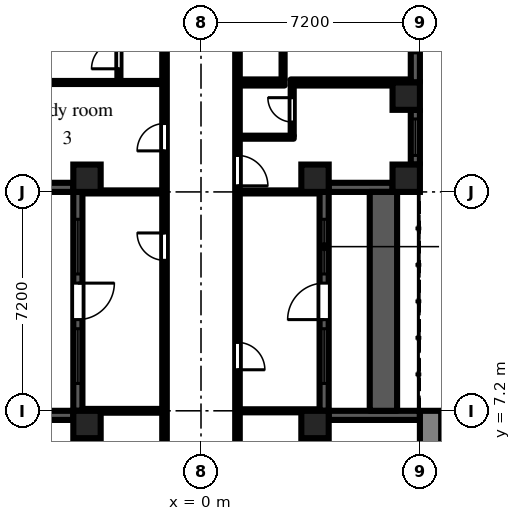
"""IFC4 building model, lengths in metres.
Left out: names, types, materials, properties, quantities, classifications, styles, units other than length and angle.
Written with IfcOpenShell. Run it as: python <this file> out.ifc"""

import sys

from ifc_helpers import new_model, si_unit, direction, frame, frame_2d, origin, origin_2d, place, context, subcontext, project, spatial, rectangle, extrude, element, fill, save


model = new_model("IFC4")
c1 = context("Model", 3, precision=1e-05, world=origin(), true_north=direction((0.0, 1.0)))
c2 = subcontext(c1, "Body", "Model", "MODEL_VIEW")
j1 = project(units=[si_unit("LENGTHUNIT", "METRE"), si_unit("PLANEANGLEUNIT", "RADIAN")], contexts=[c1])
p1 = place(None, origin())
s1 = spatial("IfcSite", under=j1, at=p1, CompositionType="ELEMENT")
p2 = place(p1, origin())
s2 = spatial("IfcBuilding", under=s1, at=p2, CompositionType="ELEMENT")
p3 = place(p2, frame((0.0, 0.0, 29.7)))
s3 = spatial("IfcBuildingStorey", under=s2, at=p3, CompositionType="ELEMENT", Elevation=29.7)
for number, where, z_axis, x_axis in (
    (1, (-3.75, 6.75, 0.0), (0.0, 0.0, 1.0), (1.0, 0.0, 0.0)),
    (2, (-3.75, 14.85, 0.0), (0.0, 0.0, 1.0), (1.0, 0.0, 0.0)),
    (3, (3.75, 6.75, 0.0), (0.0, 0.0, 1.0), (1.0, 0.0, 0.0)),
    (4, (3.75, 14.85, 0.0), (0.0, 0.0, 1.0), (1.0, 0.0, 0.0)),
    (5, (6.75, 14.85, 0.0), (0.0, 0.0, 1.0), (1.0, 0.0, 0.0)),
    (6, (6.75, 17.55, 0.0), (0.0, 0.0, 1.0), (1.0, 0.0, 0.0)),
):
    element("IfcColumn", number, at=place(p3, frame(where, z_axis=z_axis, x_axis=x_axis)), inside=s3, PredefinedType="COLUMN", context=c2, shape_type="SweptSolid", body=[
        extrude(rectangle(XDim=0.9, YDim=0.9, at=origin_2d()), origin(), (0.0, 0.0, 1.0), 3.0),
    ])
p4 = place(p3, frame((7.2, 7.05, 0.0), z_axis=(0.0, 0.0, 1.0), x_axis=(-1.0, 0.0, 0.0)))
e7 = element("IfcWall", 7, at=p4, inside=s3, PredefinedType="SOLIDWALL", context=c2, shape_type="SweptSolid", body=[
    extrude(rectangle(XDim=3.0, YDim=0.3, at=frame_2d((1.5, 0.0))), origin(), (0.0, 0.0, 1.0), 2.1),
])
p5 = place(p3, frame((4.05, 7.2, 0.0), z_axis=(0.0, 0.0, 1.0), x_axis=(0.0, 1.0, 0.0)))
e8 = element("IfcWall", 8, at=p5, inside=s3, PredefinedType="SOLIDWALL", context=c2, shape_type="SweptSolid", body=[
    extrude(rectangle(XDim=7.2, YDim=0.3, at=frame_2d((3.6, 0.0))), origin(), (0.0, 0.0, 1.0), 2.1),
])
p6 = place(p5, frame((3.0, 0.0, 0.0)))
e9 = element("IfcOpeningElement", 9, at=p6, cuts=e8, PredefinedType="OPENING", context=c2, shape_type="SweptSolid", body=[
    extrude(rectangle(XDim=1.2, YDim=2.05, at=frame_2d((0.6, 1.025))), frame((0.0, 0.16, 0.0), z_axis=(0.0, -1.0, 0.0), x_axis=(1.0, 0.0, 0.0)), (0.0, 0.0, 1.0), 0.32),
])
p7 = place(p5, frame((0.9, 0.0, 0.2)))
e10 = element("IfcOpeningElement", 10, at=p7, cuts=e8, PredefinedType="OPENING", context=c2, shape_type="SweptSolid", body=[
    extrude(rectangle(XDim=1.8, YDim=1.85, at=frame_2d((0.9, 0.925))), frame((0.0, 0.16, 0.0), z_axis=(0.0, -1.0, 0.0), x_axis=(1.0, 0.0, 0.0)), (0.0, 0.0, 1.0), 0.32),
])
p8 = place(p5, frame((4.5, 0.0, 0.2)))
e11 = element("IfcOpeningElement", 11, at=p8, cuts=e8, PredefinedType="OPENING", context=c2, shape_type="SweptSolid", body=[
    extrude(rectangle(XDim=1.8, YDim=1.85, at=frame_2d((0.9, 0.925))), frame((0.0, 0.16, 0.0), z_axis=(0.0, -1.0, 0.0), x_axis=(1.0, 0.0, 0.0)), (0.0, 0.0, 1.0), 0.32),
])
p9 = place(p3, frame((4.2, 14.55, 0.0), z_axis=(0.0, 0.0, 1.0), x_axis=(1.0, 0.0, 0.0)))
e12 = element("IfcWall", 12, at=p9, inside=s3, PredefinedType="SOLIDWALL", context=c2, shape_type="SweptSolid", body=[
    extrude(rectangle(XDim=2.1, YDim=0.3, at=frame_2d((1.05, 0.0))), origin(), (0.0, 0.0, 1.0), 2.1),
])
p10 = place(p3, frame((7.05, 15.3, 0.0), z_axis=(0.0, 0.0, 1.0), x_axis=(0.0, 1.0, 0.0)))
e13 = element("IfcWall", 13, at=p10, inside=s3, PredefinedType="SOLIDWALL", context=c2, shape_type="SweptSolid", body=[
    extrude(rectangle(XDim=1.8, YDim=0.3, at=frame_2d((0.9, 0.0))), origin(), (0.0, 0.0, 1.0), 2.1),
])
p11 = place(p10, frame((0.3, 0.0, 0.2)))
e14 = element("IfcOpeningElement", 14, at=p11, cuts=e13, PredefinedType="OPENING", context=c2, shape_type="SweptSolid", body=[
    extrude(rectangle(XDim=1.2, YDim=1.85, at=frame_2d((0.6, 0.925))), frame((0.0, 0.16, 0.0), z_axis=(0.0, -1.0, 0.0), x_axis=(1.0, 0.0, 0.0)), (0.0, 0.0, 1.0), 0.32),
])
p12 = place(p3, frame((7.05, 18.0, 0.0), z_axis=(0.0, 0.0, 1.0), x_axis=(0.0, 1.0, 0.0)))
e15 = element("IfcWall", 15, at=p12, inside=s3, PredefinedType="SOLIDWALL", context=c2, shape_type="SweptSolid", body=[
    extrude(rectangle(XDim=3.15, YDim=0.3, at=frame_2d((1.575, 0.0))), origin(), (0.0, 0.0, 1.0), 2.1),
])
p13 = place(p12, frame((0.975, 0.0, 0.2)))
e16 = element("IfcOpeningElement", 16, at=p13, cuts=e15, PredefinedType="OPENING", context=c2, shape_type="SweptSolid", body=[
    extrude(rectangle(XDim=1.2, YDim=1.85, at=frame_2d((0.6, 0.925))), frame((0.0, 0.16, 0.0), z_axis=(0.0, -1.0, 0.0), x_axis=(1.0, 0.0, 0.0)), (0.0, 0.0, 1.0), 0.32),
])
p14 = place(p3, frame((-6.3, 14.55, 0.0), z_axis=(0.0, 0.0, 1.0), x_axis=(1.0, 0.0, 0.0)))
e17 = element("IfcWall", 17, at=p14, inside=s3, PredefinedType="SOLIDWALL", context=c2, shape_type="SweptSolid", body=[
    extrude(rectangle(XDim=2.1, YDim=0.3, at=frame_2d((1.05, 0.0))), origin(), (0.0, 0.0, 1.0), 2.1),
])
p15 = place(p3, frame((-4.05, 14.4, 0.0), z_axis=(0.0, 0.0, 1.0), x_axis=(0.0, -1.0, 0.0)))
e18 = element("IfcWall", 18, at=p15, inside=s3, PredefinedType="SOLIDWALL", context=c2, shape_type="SweptSolid", body=[
    extrude(rectangle(XDim=7.2, YDim=0.3, at=frame_2d((3.6, 0.0))), origin(), (0.0, 0.0, 1.0), 2.1),
])
p16 = place(p15, frame((3.0, 0.0, 0.0)))
e19 = element("IfcOpeningElement", 19, at=p16, cuts=e18, PredefinedType="OPENING", context=c2, shape_type="SweptSolid", body=[
    extrude(rectangle(XDim=1.2, YDim=2.05, at=frame_2d((0.6, 1.025))), frame((0.0, 0.16, 0.0), z_axis=(0.0, -1.0, 0.0), x_axis=(1.0, 0.0, 0.0)), (0.0, 0.0, 1.0), 0.32),
])
p17 = place(p15, frame((0.9, 0.0, 0.2)))
e20 = element("IfcOpeningElement", 20, at=p17, cuts=e18, PredefinedType="OPENING", context=c2, shape_type="SweptSolid", body=[
    extrude(rectangle(XDim=1.8, YDim=1.85, at=frame_2d((0.9, 0.925))), frame((0.0, 0.16, 0.0), z_axis=(0.0, -1.0, 0.0), x_axis=(1.0, 0.0, 0.0)), (0.0, 0.0, 1.0), 0.32),
])
p18 = place(p15, frame((4.5, 0.0, 0.2)))
e21 = element("IfcOpeningElement", 21, at=p18, cuts=e18, PredefinedType="OPENING", context=c2, shape_type="SweptSolid", body=[
    extrude(rectangle(XDim=1.8, YDim=1.85, at=frame_2d((0.9, 0.925))), frame((0.0, 0.16, 0.0), z_axis=(0.0, -1.0, 0.0), x_axis=(1.0, 0.0, 0.0)), (0.0, 0.0, 1.0), 0.32),
])
p19 = place(p3, frame((-4.2, 7.05, 0.0), z_axis=(0.0, 0.0, 1.0), x_axis=(-1.0, 0.0, 0.0)))
e22 = element("IfcWall", 22, at=p19, inside=s3, PredefinedType="SOLIDWALL", context=c2, shape_type="SweptSolid", body=[
    extrude(rectangle(XDim=3.0, YDim=0.3, at=frame_2d((1.5, 0.0))), origin(), (0.0, 0.0, 1.0), 2.1),
])
p20 = place(p3, frame((6.0, 7.2, 0.0), z_axis=(0.0, 0.0, 1.0), x_axis=(0.0, 1.0, 0.0)))
e23 = element("IfcWall", 23, at=p20, inside=s3, PredefinedType="PARAPET", context=c2, shape_type="SweptSolid", body=[
    extrude(rectangle(XDim=7.2, YDim=0.9, at=frame_2d((3.6, 0.0))), origin(), (0.0, 0.0, 1.0), 0.8),
])
p21 = place(p3, frame((7.55, -7.2, 0.0), z_axis=(0.0, 0.0, 1.0), x_axis=(0.0, 1.0, 0.0)))
e24 = element("IfcWall", 24, at=p21, inside=s3, PredefinedType="SHEAR", context=c2, shape_type="SweptSolid", body=[
    extrude(rectangle(XDim=14.4, YDim=0.7, at=frame_2d((7.2, 0.0))), origin(), (0.0, 0.0, 1.0), 2.575),
])
p22 = place(p21, frame((6.0, 0.0, 0.0)))
e25 = element("IfcOpeningElement", 25, at=p22, cuts=e24, PredefinedType="OPENING", context=c2, shape_type="SweptSolid", body=[
    extrude(rectangle(XDim=2.4, YDim=2.2, at=frame_2d((1.2, 1.1))), frame((0.0, 0.36, 0.0), z_axis=(0.0, -1.0, 0.0), x_axis=(1.0, 0.0, 0.0)), (0.0, 0.0, 1.0), 0.72),
])
p23 = place(p3, frame((-6.9, 18.0, 0.0), z_axis=(0.0, 0.0, 1.0), x_axis=(1.0, 0.0, 0.0)))
e26 = element("IfcWall", 26, at=p23, inside=s3, PredefinedType="PARTITIONING", context=c2, shape_type="SweptSolid", body=[
    extrude(rectangle(XDim=5.625, YDim=0.1, at=frame_2d((2.812, 0.0))), origin(), (0.0, 0.0, 1.0), 2.575),
])
p24 = place(p3, frame((-3.9, 7.2, 0.0), z_axis=(0.0, 0.0, 1.0), x_axis=(1.0, 0.0, 0.0)))
e27 = element("IfcWall", 27, at=p24, inside=s3, PredefinedType="PARTITIONING", context=c2, shape_type="SweptSolid", body=[
    extrude(rectangle(XDim=2.625, YDim=0.125, at=frame_2d((1.312, 0.0))), origin(), (0.0, 0.0, 1.0), 2.575),
])
p25 = place(p3, frame((-3.9, 14.4, 0.0), z_axis=(0.0, 0.0, 1.0), x_axis=(1.0, 0.0, 0.0)))
e28 = element("IfcWall", 28, at=p25, inside=s3, PredefinedType="PARTITIONING", context=c2, shape_type="SweptSolid", body=[
    extrude(rectangle(XDim=2.625, YDim=0.1, at=frame_2d((1.312, 0.0))), origin(), (0.0, 0.0, 1.0), 2.575),
])
p26 = place(p3, frame((-2.7, 18.05, 0.0), z_axis=(0.0, 0.0, 1.0), x_axis=(0.0, 1.0, 0.0)))
e29 = element("IfcWall", 29, at=p26, inside=s3, PredefinedType="PARTITIONING", context=c2, shape_type="SweptSolid", body=[
    extrude(rectangle(XDim=14.3, YDim=0.1, at=frame_2d((7.15, 0.0))), origin(), (0.0, 0.0, 1.0), 2.575),
])
p27 = place(p26, frame((0.4, 0.0, 0.0)))
e30 = element("IfcOpeningElement", 30, at=p27, cuts=e29, PredefinedType="OPENING", context=c2, shape_type="SweptSolid", body=[
    extrude(rectangle(XDim=0.9, YDim=2.1, at=frame_2d((0.45, 1.05))), frame((0.0, 0.06, 0.0), z_axis=(0.0, -1.0, 0.0), x_axis=(1.0, 0.0, 0.0)), (0.0, 0.0, 1.0), 0.12),
])
p28 = place(p26, frame((5.8, 0.0, 0.0)))
e31 = element("IfcOpeningElement", 31, at=p28, cuts=e29, PredefinedType="OPENING", context=c2, shape_type="SweptSolid", body=[
    extrude(rectangle(XDim=0.9, YDim=2.1, at=frame_2d((0.45, 1.05))), frame((0.0, 0.06, 0.0), z_axis=(0.0, -1.0, 0.0), x_axis=(1.0, 0.0, 0.0)), (0.0, 0.0, 1.0), 0.12),
])
p29 = place(p26, frame((7.6, 0.0, 0.0)))
e32 = element("IfcOpeningElement", 32, at=p29, cuts=e29, PredefinedType="OPENING", context=c2, shape_type="SweptSolid", body=[
    extrude(rectangle(XDim=0.9, YDim=2.1, at=frame_2d((0.45, 1.05))), frame((0.0, 0.06, 0.0), z_axis=(0.0, -1.0, 0.0), x_axis=(1.0, 0.0, 0.0)), (0.0, 0.0, 1.0), 0.12),
])
p30 = place(p26, frame((13.0, 0.0, 0.0)))
e33 = element("IfcOpeningElement", 33, at=p30, cuts=e29, PredefinedType="OPENING", context=c2, shape_type="SweptSolid", body=[
    extrude(rectangle(XDim=0.9, YDim=2.1, at=frame_2d((0.45, 1.05))), frame((0.0, 0.06, 0.0), z_axis=(0.0, -1.0, 0.0), x_axis=(1.0, 0.0, 0.0)), (0.0, 0.0, 1.0), 0.12),
])
p31 = place(p3, frame((-1.2, 1.125, 0.0), z_axis=(0.0, 0.0, 1.0), x_axis=(0.0, 1.0, 0.0)))
e34 = element("IfcWall", 34, at=p31, inside=s3, PredefinedType="PARTITIONING", context=c2, shape_type="SweptSolid", body=[
    extrude(rectangle(XDim=35.375, YDim=0.15, at=frame_2d((17.688, 0.0))), origin(), (0.0, 0.0, 1.0), 2.575),
])
p32 = place(p31, frame((2.625, 0.0, 0.0)))
e35 = element("IfcOpeningElement", 35, at=p32, cuts=e34, PredefinedType="OPENING", context=c2, shape_type="SweptSolid", body=[
    extrude(rectangle(XDim=0.9, YDim=2.1, at=frame_2d((0.45, 1.05))), frame((0.0, 0.085, 0.0), z_axis=(0.0, -1.0, 0.0), x_axis=(1.0, 0.0, 0.0)), (0.0, 0.0, 1.0), 0.17),
])
p33 = place(p31, frame((11.025, 0.0, 0.0)))
e36 = element("IfcOpeningElement", 36, at=p33, cuts=e34, PredefinedType="OPENING", context=c2, shape_type="SweptSolid", body=[
    extrude(rectangle(XDim=0.9, YDim=2.1, at=frame_2d((0.45, 1.05))), frame((0.0, 0.085, 0.0), z_axis=(0.0, -1.0, 0.0), x_axis=(1.0, 0.0, 0.0)), (0.0, 0.0, 1.0), 0.17),
])
p34 = place(p31, frame((14.625, 0.0, 0.0)))
e37 = element("IfcOpeningElement", 37, at=p34, cuts=e34, PredefinedType="OPENING", context=c2, shape_type="SweptSolid", body=[
    extrude(rectangle(XDim=0.9, YDim=2.1, at=frame_2d((0.45, 1.05))), frame((0.0, 0.085, 0.0), z_axis=(0.0, -1.0, 0.0), x_axis=(1.0, 0.0, 0.0)), (0.0, 0.0, 1.0), 0.17),
])
p35 = place(p31, frame((32.825, 0.0, 0.0)))
e38 = element("IfcOpeningElement", 38, at=p35, cuts=e34, PredefinedType="OPENING", context=c2, shape_type="SweptSolid", body=[
    extrude(rectangle(XDim=1.0, YDim=2.1, at=frame_2d((0.5, 1.05))), frame((0.0, 0.085, 0.0), z_axis=(0.0, -1.0, 0.0), x_axis=(1.0, 0.0, 0.0)), (0.0, 0.0, 1.0), 0.17),
])
p36 = place(p3, frame((1.2, 1.125, 0.0), z_axis=(0.0, 0.0, 1.0), x_axis=(0.0, 1.0, 0.0)))
e39 = element("IfcWall", 39, at=p36, inside=s3, PredefinedType="PARTITIONING", context=c2, shape_type="SweptSolid", body=[
    extrude(rectangle(XDim=35.375, YDim=0.15, at=frame_2d((17.688, 0.0))), origin(), (0.0, 0.0, 1.0), 2.575),
])
p37 = place(p36, frame((3.725, 0.0, 0.0)))
e40 = element("IfcOpeningElement", 40, at=p37, cuts=e39, PredefinedType="OPENING", context=c2, shape_type="SweptSolid", body=[
    extrude(rectangle(XDim=0.9, YDim=2.1, at=frame_2d((0.45, 1.05))), frame((0.0, 0.085, 0.0), z_axis=(0.0, -1.0, 0.0), x_axis=(1.0, 0.0, 0.0)), (0.0, 0.0, 1.0), 0.17),
])
p38 = place(p36, frame((7.425, 0.0, 0.0)))
e41 = element("IfcOpeningElement", 41, at=p38, cuts=e39, PredefinedType="OPENING", context=c2, shape_type="SweptSolid", body=[
    extrude(rectangle(XDim=0.9, YDim=2.1, at=frame_2d((0.45, 1.05))), frame((0.0, 0.085, 0.0), z_axis=(0.0, -1.0, 0.0), x_axis=(1.0, 0.0, 0.0)), (0.0, 0.0, 1.0), 0.17),
])
p39 = place(p36, frame((13.475, 0.0, 0.0)))
e42 = element("IfcOpeningElement", 42, at=p39, cuts=e39, PredefinedType="OPENING", context=c2, shape_type="SweptSolid", body=[
    extrude(rectangle(XDim=1.0, YDim=2.1, at=frame_2d((0.5, 1.05))), frame((0.0, 0.085, 0.0), z_axis=(0.0, -1.0, 0.0), x_axis=(1.0, 0.0, 0.0)), (0.0, 0.0, 1.0), 0.17),
])
p40 = place(p36, frame((32.825, 0.0, 0.0)))
e43 = element("IfcOpeningElement", 43, at=p40, cuts=e39, PredefinedType="OPENING", context=c2, shape_type="SweptSolid", body=[
    extrude(rectangle(XDim=1.0, YDim=2.1, at=frame_2d((0.5, 1.05))), frame((0.0, 0.085, 0.0), z_axis=(0.0, -1.0, 0.0), x_axis=(1.0, 0.0, 0.0)), (0.0, 0.0, 1.0), 0.17),
])
for number, where, z_axis, x_axis in (
    (44, (1.275, 7.2, 0.0), (0.0, 0.0, 1.0), (1.0, 0.0, 0.0)),
    (45, (1.275, 14.4, 0.0), (0.0, 0.0, 1.0), (1.0, 0.0, 0.0)),
):
    element("IfcWall", number, at=place(p3, frame(where, z_axis=z_axis, x_axis=x_axis)), inside=s3, PredefinedType="PARTITIONING", context=c2, shape_type="SweptSolid", body=[
        extrude(rectangle(XDim=2.625, YDim=0.1, at=frame_2d((1.312, 0.0))), origin(), (0.0, 0.0, 1.0), 2.575),
    ])
p41 = place(p3, frame((1.275, 16.2, 0.0), z_axis=(0.0, 0.0, 1.0), x_axis=(1.0, 0.0, 0.0)))
e46 = element("IfcWall", 46, at=p41, inside=s3, PredefinedType="PARTITIONING", context=c2, shape_type="SweptSolid", body=[
    extrude(rectangle(XDim=1.775, YDim=0.1, at=frame_2d((0.888, 0.0))), origin(), (0.0, 0.0, 1.0), 2.575),
])
p42 = place(p3, frame((1.275, 18.0, 0.0), z_axis=(0.0, 0.0, 1.0), x_axis=(1.0, 0.0, 0.0)))
e47 = element("IfcWall", 47, at=p42, inside=s3, PredefinedType="PARTITIONING", context=c2, shape_type="SweptSolid", body=[
    extrude(rectangle(XDim=1.475, YDim=0.2, at=frame_2d((0.738, 0.0))), origin(), (0.0, 0.0, 1.0), 2.575),
])
p43 = place(p3, frame((2.7, 18.1, 0.0), z_axis=(0.0, 0.0, 1.0), x_axis=(0.0, 1.0, 0.0)))
e48 = element("IfcWall", 48, at=p43, inside=s3, PredefinedType="PARTITIONING", context=c2, shape_type="SweptSolid", body=[
    extrude(rectangle(XDim=14.25, YDim=0.1, at=frame_2d((7.125, 0.0))), origin(), (0.0, 0.0, 1.0), 2.575),
])
p44 = place(p43, frame((3.23, 0.0, 0.0)))
e49 = element("IfcOpeningElement", 49, at=p44, cuts=e48, PredefinedType="OPENING", context=c2, shape_type="SweptSolid", body=[
    extrude(rectangle(XDim=0.9, YDim=2.1, at=frame_2d((0.45, 1.05))), frame((0.0, 0.06, 0.0), z_axis=(0.0, -1.0, 0.0), x_axis=(1.0, 0.0, 0.0)), (0.0, 0.0, 1.0), 0.12),
])
p45 = place(p43, frame((10.07, 0.0, 0.0)))
e50 = element("IfcOpeningElement", 50, at=p45, cuts=e48, PredefinedType="OPENING", context=c2, shape_type="SweptSolid", body=[
    extrude(rectangle(XDim=0.9, YDim=2.1, at=frame_2d((0.45, 1.05))), frame((0.0, 0.06, 0.0), z_axis=(0.0, -1.0, 0.0), x_axis=(1.0, 0.0, 0.0)), (0.0, 0.0, 1.0), 0.12),
])
p46 = place(p3, frame((3.0, 16.25, 0.0), z_axis=(0.0, 0.0, 1.0), x_axis=(0.0, 1.0, 0.0)))
e51 = element("IfcWall", 51, at=p46, inside=s3, PredefinedType="PARTITIONING", context=c2, shape_type="SweptSolid", body=[
    extrude(rectangle(XDim=1.65, YDim=0.1, at=frame_2d((0.825, 0.0))), origin(), (0.0, 0.0, 1.0), 2.575),
])
p47 = place(p46, frame((0.45, 0.0, 0.0)))
e52 = element("IfcOpeningElement", 52, at=p47, cuts=e51, PredefinedType="OPENING", context=c2, shape_type="SweptSolid", body=[
    extrude(rectangle(XDim=0.8, YDim=2.1, at=frame_2d((0.4, 1.05))), frame((0.0, 0.06, 0.0), z_axis=(0.0, -1.0, 0.0), x_axis=(1.0, 0.0, 0.0)), (0.0, 0.0, 1.0), 0.12),
])
p48 = place(p3, frame((2.95, 18.0, 0.0), z_axis=(0.0, 0.0, 1.0), x_axis=(1.0, 0.0, 0.0)))
e53 = element("IfcWall", 53, at=p48, inside=s3, PredefinedType="PARTITIONING", context=c2, shape_type="SweptSolid", body=[
    extrude(rectangle(XDim=3.95, YDim=0.2, at=frame_2d((1.975, 0.0))), origin(), (0.0, 0.0, 1.0), 2.575),
])
p49 = place(p6, origin())
e54 = element("IfcDoor", 54, at=p49, inside=s3, OperationType="SINGLE_SWING_LEFT", PredefinedType="DOOR", context=c2, shape_type="SweptSolid", body=[
    extrude(rectangle(XDim=1.2, YDim=2.05, at=frame_2d((0.6, 1.025))), frame((0.0, 0.025, 0.0), z_axis=(0.0, -1.0, 0.0), x_axis=(1.0, 0.0, 0.0)), (0.0, 0.0, 1.0), 0.05),
])
fill(e9, e54)
p50 = place(p7, origin())
e55 = element("IfcWindow", 55, at=p50, inside=s3, PartitioningType="SINGLE_PANEL", PredefinedType="WINDOW", context=c2, shape_type="SweptSolid", body=[
    extrude(rectangle(XDim=1.8, YDim=1.85, at=frame_2d((0.9, 0.925))), frame((0.0, 0.03, 0.0), z_axis=(0.0, -1.0, 0.0), x_axis=(1.0, 0.0, 0.0)), (0.0, 0.0, 1.0), 0.06),
])
fill(e10, e55)
p51 = place(p8, origin())
e56 = element("IfcWindow", 56, at=p51, inside=s3, PartitioningType="SINGLE_PANEL", PredefinedType="WINDOW", context=c2, shape_type="SweptSolid", body=[
    extrude(rectangle(XDim=1.8, YDim=1.85, at=frame_2d((0.9, 0.925))), frame((0.0, 0.03, 0.0), z_axis=(0.0, -1.0, 0.0), x_axis=(1.0, 0.0, 0.0)), (0.0, 0.0, 1.0), 0.06),
])
fill(e11, e56)
p52 = place(p11, origin())
e57 = element("IfcWindow", 57, at=p52, inside=s3, PartitioningType="SINGLE_PANEL", PredefinedType="WINDOW", context=c2, shape_type="SweptSolid", body=[
    extrude(rectangle(XDim=1.2, YDim=1.85, at=frame_2d((0.6, 0.925))), frame((0.0, 0.03, 0.0), z_axis=(0.0, -1.0, 0.0), x_axis=(1.0, 0.0, 0.0)), (0.0, 0.0, 1.0), 0.06),
])
fill(e14, e57)
p53 = place(p13, origin())
e58 = element("IfcWindow", 58, at=p53, inside=s3, PartitioningType="SINGLE_PANEL", PredefinedType="WINDOW", context=c2, shape_type="SweptSolid", body=[
    extrude(rectangle(XDim=1.2, YDim=1.85, at=frame_2d((0.6, 0.925))), frame((0.0, 0.03, 0.0), z_axis=(0.0, -1.0, 0.0), x_axis=(1.0, 0.0, 0.0)), (0.0, 0.0, 1.0), 0.06),
])
fill(e16, e58)
p54 = place(p16, origin())
e59 = element("IfcDoor", 59, at=p54, inside=s3, OperationType="SINGLE_SWING_LEFT", PredefinedType="DOOR", context=c2, shape_type="SweptSolid", body=[
    extrude(rectangle(XDim=1.2, YDim=2.05, at=frame_2d((0.6, 1.025))), frame((0.0, 0.025, 0.0), z_axis=(0.0, -1.0, 0.0), x_axis=(1.0, 0.0, 0.0)), (0.0, 0.0, 1.0), 0.05),
])
fill(e19, e59)
p55 = place(p17, origin())
e60 = element("IfcWindow", 60, at=p55, inside=s3, PartitioningType="SINGLE_PANEL", PredefinedType="WINDOW", context=c2, shape_type="SweptSolid", body=[
    extrude(rectangle(XDim=1.8, YDim=1.85, at=frame_2d((0.9, 0.925))), frame((0.0, 0.03, 0.0), z_axis=(0.0, -1.0, 0.0), x_axis=(1.0, 0.0, 0.0)), (0.0, 0.0, 1.0), 0.06),
])
fill(e20, e60)
p56 = place(p18, origin())
e61 = element("IfcWindow", 61, at=p56, inside=s3, PartitioningType="SINGLE_PANEL", PredefinedType="WINDOW", context=c2, shape_type="SweptSolid", body=[
    extrude(rectangle(XDim=1.8, YDim=1.85, at=frame_2d((0.9, 0.925))), frame((0.0, 0.03, 0.0), z_axis=(0.0, -1.0, 0.0), x_axis=(1.0, 0.0, 0.0)), (0.0, 0.0, 1.0), 0.06),
])
fill(e21, e61)
p57 = place(p33, origin())
e62 = element("IfcDoor", 62, at=p57, inside=s3, OperationType="SINGLE_SWING_RIGHT", PredefinedType="DOOR", context=c2, shape_type="SweptSolid", body=[
    extrude(rectangle(XDim=0.9, YDim=2.1, at=frame_2d((0.45, 1.05))), frame((0.0, 0.025, 0.0), z_axis=(0.0, -1.0, 0.0), x_axis=(1.0, 0.0, 0.0)), (0.0, 0.0, 1.0), 0.05),
])
fill(e36, e62)
p58 = place(p34, origin())
e63 = element("IfcDoor", 63, at=p58, inside=s3, OperationType="SINGLE_SWING_LEFT", PredefinedType="DOOR", context=c2, shape_type="SweptSolid", body=[
    extrude(rectangle(XDim=0.9, YDim=2.1, at=frame_2d((0.45, 1.05))), frame((0.0, 0.025, 0.0), z_axis=(0.0, -1.0, 0.0), x_axis=(1.0, 0.0, 0.0)), (0.0, 0.0, 1.0), 0.05),
])
fill(e37, e63)
p59 = place(p27, origin())
e64 = element("IfcDoor", 64, at=p59, inside=s3, OperationType="SINGLE_SWING_LEFT", PredefinedType="DOOR", context=c2, shape_type="SweptSolid", body=[
    extrude(rectangle(XDim=0.9, YDim=2.1, at=frame_2d((0.45, 1.05))), frame((0.0, 0.025, 0.0), z_axis=(0.0, -1.0, 0.0), x_axis=(1.0, 0.0, 0.0)), (0.0, 0.0, 1.0), 0.05),
])
fill(e30, e64)
p60 = place(p38, frame((0.9, 0.0, 0.0), z_axis=(0.0, 0.0, 1.0), x_axis=(-1.0, 0.0, 0.0)))
e65 = element("IfcDoor", 65, at=p60, inside=s3, OperationType="SINGLE_SWING_RIGHT", PredefinedType="DOOR", context=c2, shape_type="SweptSolid", body=[
    extrude(rectangle(XDim=0.9, YDim=2.1, at=frame_2d((0.45, 1.05))), frame((0.0, 0.025, 0.0), z_axis=(0.0, -1.0, 0.0), x_axis=(1.0, 0.0, 0.0)), (0.0, 0.0, 1.0), 0.05),
])
fill(e41, e65)
p61 = place(p47, origin())
e66 = element("IfcDoor", 66, at=p61, inside=s3, OperationType="SINGLE_SWING_RIGHT", PredefinedType="DOOR", context=c2, shape_type="SweptSolid", body=[
    extrude(rectangle(XDim=0.8, YDim=2.1, at=frame_2d((0.4, 1.05))), frame((0.0, 0.025, 0.0), z_axis=(0.0, -1.0, 0.0), x_axis=(1.0, 0.0, 0.0)), (0.0, 0.0, 1.0), 0.05),
])
fill(e52, e66)
p62 = place(p39, frame((1.0, 0.0, 0.0), z_axis=(0.0, 0.0, 1.0), x_axis=(-1.0, 0.0, 0.0)))
e67 = element("IfcDoor", 67, at=p62, inside=s3, OperationType="SINGLE_SWING_RIGHT", PredefinedType="DOOR", context=c2, shape_type="SweptSolid", body=[
    extrude(rectangle(XDim=1.0, YDim=2.1, at=frame_2d((0.5, 1.05))), frame((0.0, 0.025, 0.0), z_axis=(0.0, -1.0, 0.0), x_axis=(1.0, 0.0, 0.0)), (0.0, 0.0, 1.0), 0.05),
])
fill(e42, e67)
save(model, sys.argv[1])
